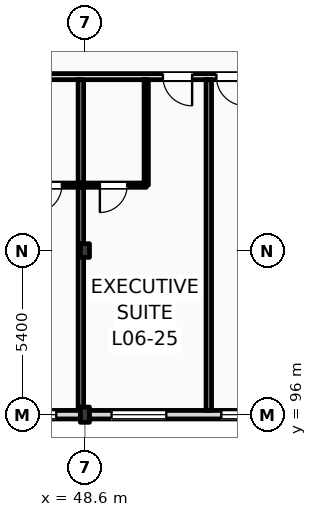
"""IFC4 building model, lengths in metres.
Left out: names, types, materials, properties, quantities, classifications, styles, units other than length and angle.
Written with IfcOpenShell. Run it as: python <this file> out.ifc"""

import sys

from ifc_helpers import new_model, si_unit, direction, frame, frame_2d, origin, origin_2d, place, context, subcontext, project, spatial, rectangle, i_section, extrude, element, fill, save


model = new_model("IFC4")
c1 = context("Model", 3, precision=1e-05, world=origin(), true_north=direction((0.0, 1.0)))
c2 = subcontext(c1, "Body", "Model", "MODEL_VIEW")
j1 = project(units=[si_unit("LENGTHUNIT", "METRE"), si_unit("PLANEANGLEUNIT", "RADIAN")], contexts=[c1])
p1 = place(None, origin())
s1 = spatial("IfcSite", under=j1, at=p1, CompositionType="ELEMENT")
p2 = place(p1, origin())
s2 = spatial("IfcBuilding", under=s1, at=p2, CompositionType="ELEMENT")
p3 = place(p2, frame((0.0, 0.0, 28.2)))
s3 = spatial("IfcBuildingStorey", under=s2, at=p3, CompositionType="ELEMENT", Elevation=28.2)
p4 = place(p3, frame((48.6, 96.0, 0.0), z_axis=(0.0, 0.0, 1.0), x_axis=(1.0, 0.0, 0.0)))
e1 = element("IfcColumn", 1, at=p4, inside=s3, PredefinedType="COLUMN", context=c2, shape_type="SweptSolid", body=[
    extrude(i_section(OverallWidth=0.3, OverallDepth=0.5, WebThickness=0.014, FlangeThickness=0.028, FilletRadius=0.027, at=origin_2d()), origin(), (0.0, 0.0, 1.0), 3.6),
])
p5 = place(p3, frame((48.6, 101.4, 0.0), z_axis=(0.0, 0.0, 1.0), x_axis=(1.0, 0.0, 0.0)))
e2 = element("IfcColumn", 2, at=p5, inside=s3, PredefinedType="COLUMN", context=c2, shape_type="SweptSolid", body=[
    extrude(i_section(OverallWidth=0.3, OverallDepth=0.45, WebThickness=0.014, FlangeThickness=0.026, FilletRadius=0.027, at=origin_2d()), origin(), (0.0, 0.0, 1.0), 3.6),
])
p6 = place(p3, frame((25.2, 96.0, 0.0), z_axis=(0.0, 0.0, 1.0), x_axis=(1.0, 0.0, 0.0)))
e3 = element("IfcWall", 3, at=p6, inside=s3, PredefinedType="STANDARD", context=c2, shape_type="SweptSolid", body=[
    extrude(rectangle(XDim=94.8, YDim=0.28, at=frame_2d((47.4, 0.0))), origin(), (0.0, 0.0, 1.0), 2.8),
])
p7 = place(p6, frame((16.454, 0.0, 0.9)))
e4 = element("IfcOpeningElement", 4, at=p7, cuts=e3, PredefinedType="OPENING", context=c2, shape_type="SweptSolid", body=[
    extrude(rectangle(XDim=2.7, YDim=1.72, at=frame_2d((1.35, 0.86))), frame((0.0, 0.15, 0.0), z_axis=(0.0, -1.0, 0.0), x_axis=(1.0, 0.0, 0.0)), (0.0, 0.0, 1.0), 0.3),
])
p8 = place(p6, frame((20.068, 0.0, 0.9)))
e5 = element("IfcOpeningElement", 5, at=p8, cuts=e3, PredefinedType="OPENING", context=c2, shape_type="SweptSolid", body=[
    extrude(rectangle(XDim=2.389, YDim=1.72, at=frame_2d((1.194, 0.86))), frame((0.0, 0.15, 0.0), z_axis=(0.0, -1.0, 0.0), x_axis=(1.0, 0.0, 0.0)), (0.0, 0.0, 1.0), 0.3),
])
p9 = place(p6, frame((24.277, 0.0, 0.9)))
e6 = element("IfcOpeningElement", 6, at=p9, cuts=e3, PredefinedType="OPENING", context=c2, shape_type="SweptSolid", body=[
    extrude(rectangle(XDim=1.8, YDim=1.72, at=frame_2d((0.9, 0.86))), frame((0.0, 0.15, 0.0), z_axis=(0.0, -1.0, 0.0), x_axis=(1.0, 0.0, 0.0)), (0.0, 0.0, 1.0), 0.3),
])
p10 = place(p6, frame((27.885, 0.0, 0.9)))
e7 = element("IfcOpeningElement", 7, at=p10, cuts=e3, PredefinedType="OPENING", context=c2, shape_type="SweptSolid", body=[
    extrude(rectangle(XDim=2.388, YDim=1.72, at=frame_2d((1.194, 0.86))), frame((0.0, 0.15, 0.0), z_axis=(0.0, -1.0, 0.0), x_axis=(1.0, 0.0, 0.0)), (0.0, 0.0, 1.0), 0.3),
])
p11 = place(p6, frame((32.093, 0.0, 0.9)))
e8 = element("IfcOpeningElement", 8, at=p11, cuts=e3, PredefinedType="OPENING", context=c2, shape_type="SweptSolid", body=[
    extrude(rectangle(XDim=1.8, YDim=1.72, at=frame_2d((0.9, 0.86))), frame((0.0, 0.15, 0.0), z_axis=(0.0, -1.0, 0.0), x_axis=(1.0, 0.0, 0.0)), (0.0, 0.0, 1.0), 0.3),
])
p12 = place(p6, frame((35.702, 0.0, 0.9)))
e9 = element("IfcOpeningElement", 9, at=p12, cuts=e3, PredefinedType="OPENING", context=c2, shape_type="SweptSolid", body=[
    extrude(rectangle(XDim=2.488, YDim=1.72, at=frame_2d((1.244, 0.86))), frame((0.0, 0.15, 0.0), z_axis=(0.0, -1.0, 0.0), x_axis=(1.0, 0.0, 0.0)), (0.0, 0.0, 1.0), 0.3),
])
p13 = place(p6, frame((55.56, 0.0, 0.9)))
e10 = element("IfcOpeningElement", 10, at=p13, cuts=e3, PredefinedType="OPENING", context=c2, shape_type="SweptSolid", body=[
    extrude(rectangle(XDim=1.8, YDim=1.72, at=frame_2d((0.9, 0.86))), frame((0.0, 0.15, 0.0), z_axis=(0.0, -1.0, 0.0), x_axis=(1.0, 0.0, 0.0)), (0.0, 0.0, 1.0), 0.3),
])
p14 = place(p6, frame((58.985, 0.0, 0.9)))
e11 = element("IfcOpeningElement", 11, at=p14, cuts=e3, PredefinedType="OPENING", context=c2, shape_type="SweptSolid", body=[
    extrude(rectangle(XDim=1.8, YDim=1.72, at=frame_2d((0.9, 0.86))), frame((0.0, 0.15, 0.0), z_axis=(0.0, -1.0, 0.0), x_axis=(1.0, 0.0, 0.0)), (0.0, 0.0, 1.0), 0.3),
])
p15 = place(p6, frame((63.21, 0.0, 0.9)))
e12 = element("IfcOpeningElement", 12, at=p15, cuts=e3, PredefinedType="OPENING", context=c2, shape_type="SweptSolid", body=[
    extrude(rectangle(XDim=2.525, YDim=1.72, at=frame_2d((1.262, 0.86))), frame((0.0, 0.15, 0.0), z_axis=(0.0, -1.0, 0.0), x_axis=(1.0, 0.0, 0.0)), (0.0, 0.0, 1.0), 0.3),
])
p16 = place(p6, frame((66.955, 0.0, 0.9)))
e13 = element("IfcOpeningElement", 13, at=p16, cuts=e3, PredefinedType="OPENING", context=c2, shape_type="SweptSolid", body=[
    extrude(rectangle(XDim=1.8, YDim=1.72, at=frame_2d((0.9, 0.86))), frame((0.0, 0.15, 0.0), z_axis=(0.0, -1.0, 0.0), x_axis=(1.0, 0.0, 0.0)), (0.0, 0.0, 1.0), 0.3),
])
p17 = place(p6, frame((71.892, 0.0, 0.9)))
e14 = element("IfcOpeningElement", 14, at=p17, cuts=e3, PredefinedType="OPENING", context=c2, shape_type="SweptSolid", body=[
    extrude(rectangle(XDim=1.1, YDim=1.5, at=frame_2d((0.55, 0.75))), frame((0.0, 0.15, 0.0), z_axis=(0.0, -1.0, 0.0), x_axis=(1.0, 0.0, 0.0)), (0.0, 0.0, 1.0), 0.3),
])
p18 = place(p6, frame((75.802, 0.0, 0.9)))
e15 = element("IfcOpeningElement", 15, at=p18, cuts=e3, PredefinedType="OPENING", context=c2, shape_type="SweptSolid", body=[
    extrude(rectangle(XDim=1.25, YDim=1.6, at=frame_2d((0.625, 0.8))), frame((0.0, 0.15, 0.0), z_axis=(0.0, -1.0, 0.0), x_axis=(1.0, 0.0, 0.0)), (0.0, 0.0, 1.0), 0.3),
])
p19 = place(p6, frame((79.712, 0.0, 0.9)))
e16 = element("IfcOpeningElement", 16, at=p19, cuts=e3, PredefinedType="OPENING", context=c2, shape_type="SweptSolid", body=[
    extrude(rectangle(XDim=1.4, YDim=1.7, at=frame_2d((0.7, 0.85))), frame((0.0, 0.15, 0.0), z_axis=(0.0, -1.0, 0.0), x_axis=(1.0, 0.0, 0.0)), (0.0, 0.0, 1.0), 0.3),
])
p20 = place(p6, frame((83.597, 0.0, 0.9)))
e17 = element("IfcOpeningElement", 17, at=p20, cuts=e3, PredefinedType="OPENING", context=c2, shape_type="SweptSolid", body=[
    extrude(rectangle(XDim=1.6, YDim=1.72, at=frame_2d((0.8, 0.86))), frame((0.0, 0.15, 0.0), z_axis=(0.0, -1.0, 0.0), x_axis=(1.0, 0.0, 0.0)), (0.0, 0.0, 1.0), 0.3),
])
p21 = place(p6, frame((87.507, 0.0, 0.9)))
e18 = element("IfcOpeningElement", 18, at=p21, cuts=e3, PredefinedType="OPENING", context=c2, shape_type="SweptSolid", body=[
    extrude(rectangle(XDim=1.75, YDim=1.72, at=frame_2d((0.875, 0.86))), frame((0.0, 0.15, 0.0), z_axis=(0.0, -1.0, 0.0), x_axis=(1.0, 0.0, 0.0)), (0.0, 0.0, 1.0), 0.3),
])
p22 = place(p6, frame((91.328, 0.0, 0.9)))
e19 = element("IfcOpeningElement", 19, at=p22, cuts=e3, PredefinedType="OPENING", context=c2, shape_type="SweptSolid", body=[
    extrude(rectangle(XDim=2.0, YDim=1.72, at=frame_2d((1.0, 0.86))), frame((0.0, 0.15, 0.0), z_axis=(0.0, -1.0, 0.0), x_axis=(1.0, 0.0, 0.0)), (0.0, 0.0, 1.0), 0.3),
])
p23 = place(p3, frame((40.76, 107.12, 0.0), z_axis=(0.0, 0.0, 1.0), x_axis=(1.0, 0.0, 0.0)))
e20 = element("IfcWall", 20, at=p23, inside=s3, PredefinedType="PARTITIONING", context=c2, shape_type="SweptSolid", body=[
    extrude(rectangle(XDim=23.44, YDim=0.2, at=frame_2d((11.72, 0.0))), origin(), (0.0, 0.0, 1.0), 3.36),
])
p24 = place(p23, frame((2.639, 0.0, 0.0)))
e21 = element("IfcOpeningElement", 21, at=p24, cuts=e20, PredefinedType="OPENING", context=c2, shape_type="SweptSolid", body=[
    extrude(rectangle(XDim=0.96, YDim=2.2, at=frame_2d((0.48, 1.1))), frame((0.0, 0.11, 0.0), z_axis=(0.0, -1.0, 0.0), x_axis=(1.0, 0.0, 0.0)), (0.0, 0.0, 1.0), 0.22),
])
p25 = place(p23, frame((4.348, 0.0, 0.0)))
e22 = element("IfcOpeningElement", 22, at=p25, cuts=e20, PredefinedType="OPENING", context=c2, shape_type="SweptSolid", body=[
    extrude(rectangle(XDim=0.96, YDim=2.2, at=frame_2d((0.48, 1.1))), frame((0.0, 0.11, 0.0), z_axis=(0.0, -1.0, 0.0), x_axis=(1.0, 0.0, 0.0)), (0.0, 0.0, 1.0), 0.22),
])
p26 = place(p23, frame((10.406, 0.0, 0.0)))
e23 = element("IfcOpeningElement", 23, at=p26, cuts=e20, PredefinedType="OPENING", context=c2, shape_type="SweptSolid", body=[
    extrude(rectangle(XDim=0.96, YDim=2.2, at=frame_2d((0.48, 1.1))), frame((0.0, 0.11, 0.0), z_axis=(0.0, -1.0, 0.0), x_axis=(1.0, 0.0, 0.0)), (0.0, 0.0, 1.0), 0.22),
])
p27 = place(p23, frame((12.164, 0.0, 0.0)))
e24 = element("IfcOpeningElement", 24, at=p27, cuts=e20, PredefinedType="OPENING", context=c2, shape_type="SweptSolid", body=[
    extrude(rectangle(XDim=0.96, YDim=2.2, at=frame_2d((0.48, 1.1))), frame((0.0, 0.11, 0.0), z_axis=(0.0, -1.0, 0.0), x_axis=(1.0, 0.0, 0.0)), (0.0, 0.0, 1.0), 0.22),
])
p28 = place(p23, frame((18.223, 0.0, 0.0)))
e25 = element("IfcOpeningElement", 25, at=p28, cuts=e20, PredefinedType="OPENING", context=c2, shape_type="SweptSolid", body=[
    extrude(rectangle(XDim=0.96, YDim=2.2, at=frame_2d((0.48, 1.1))), frame((0.0, 0.11, 0.0), z_axis=(0.0, -1.0, 0.0), x_axis=(1.0, 0.0, 0.0)), (0.0, 0.0, 1.0), 0.22),
])
p29 = place(p23, frame((20.031, 0.0, 0.0)))
e26 = element("IfcOpeningElement", 26, at=p29, cuts=e20, PredefinedType="OPENING", context=c2, shape_type="SweptSolid", body=[
    extrude(rectangle(XDim=0.96, YDim=2.2, at=frame_2d((0.48, 1.1))), frame((0.0, 0.11, 0.0), z_axis=(0.0, -1.0, 0.0), x_axis=(1.0, 0.0, 0.0)), (0.0, 0.0, 1.0), 0.22),
])
p30 = place(p3, frame((48.467, 96.14, 0.0), z_axis=(0.0, 0.0, 1.0), x_axis=(0.0, 1.0, 0.0)))
e27 = element("IfcWall", 27, at=p30, inside=s3, PredefinedType="PARTITIONING", context=c2, shape_type="SweptSolid", body=[
    extrude(rectangle(XDim=10.88, YDim=0.18, at=frame_2d((5.44, 0.0))), origin(), (0.0, 0.0, 1.0), 2.99),
])
p31 = place(p3, frame((46.317, 103.55, 0.0), z_axis=(0.0, 0.0, 1.0), x_axis=(1.0, 0.0, 0.0)))
e28 = element("IfcWall", 28, at=p31, inside=s3, PredefinedType="PARTITIONING", context=c2, shape_type="SweptSolid", body=[
    extrude(rectangle(XDim=2.15, YDim=0.14, at=frame_2d((1.075, 0.0))), origin(), (0.0, 0.0, 1.0), 3.36),
])
p32 = place(p31, frame((0.625, 0.0, 0.0)))
e29 = element("IfcOpeningElement", 29, at=p32, cuts=e28, PredefinedType="OPENING", context=c2, shape_type="SweptSolid", body=[
    extrude(rectangle(XDim=0.9, YDim=2.1, at=frame_2d((0.45, 1.05))), frame((0.0, 0.08, 0.0), z_axis=(0.0, -1.0, 0.0), x_axis=(1.0, 0.0, 0.0)), (0.0, 0.0, 1.0), 0.16),
])
p33 = place(p3, frame((52.675, 96.14, 0.0), z_axis=(0.0, 0.0, 1.0), x_axis=(0.0, 1.0, 0.0)))
e30 = element("IfcWall", 30, at=p33, inside=s3, PredefinedType="PARTITIONING", context=c2, shape_type="SweptSolid", body=[
    extrude(rectangle(XDim=10.88, YDim=0.18, at=frame_2d((5.44, 0.0))), origin(), (0.0, 0.0, 1.0), 3.36),
])
p34 = place(p3, frame((50.617, 103.55, 0.0), z_axis=(0.0, 0.0, 1.0), x_axis=(0.0, 1.0, 0.0)))
e31 = element("IfcWall", 31, at=p34, inside=s3, PredefinedType="PARTITIONING", context=c2, shape_type="SweptSolid", body=[
    extrude(rectangle(XDim=3.47, YDim=0.14, at=frame_2d((1.735, 0.0))), origin(), (0.0, 0.0, 1.0), 3.36),
])
p35 = place(p3, frame((48.467, 103.55, 0.0), z_axis=(0.0, 0.0, 1.0), x_axis=(1.0, 0.0, 0.0)))
e32 = element("IfcWall", 32, at=p35, inside=s3, PredefinedType="PARTITIONING", context=c2, shape_type="SweptSolid", body=[
    extrude(rectangle(XDim=2.15, YDim=0.14, at=frame_2d((1.075, 0.0))), origin(), (0.0, 0.0, 1.0), 3.36),
])
p36 = place(p35, frame((0.625, 0.0, 0.0)))
e33 = element("IfcOpeningElement", 33, at=p36, cuts=e32, PredefinedType="OPENING", context=c2, shape_type="SweptSolid", body=[
    extrude(rectangle(XDim=0.9, YDim=2.1, at=frame_2d((0.45, 1.05))), frame((0.0, 0.08, 0.0), z_axis=(0.0, -1.0, 0.0), x_axis=(1.0, 0.0, 0.0)), (0.0, 0.0, 1.0), 0.16),
])
p37 = place(p8, origin())
e34 = element("IfcWindow", 34, at=p37, inside=s3, PartitioningType="DOUBLE_PANEL_VERTICAL", PredefinedType="WINDOW", context=c2, shape_type="SweptSolid", body=[
    extrude(rectangle(XDim=2.389, YDim=1.72, at=frame_2d((1.194, 0.86))), frame((0.0, 0.03, 0.0), z_axis=(0.0, -1.0, 0.0), x_axis=(1.0, 0.0, 0.0)), (0.0, 0.0, 1.0), 0.06),
])
fill(e5, e34)
p38 = place(p9, origin())
e35 = element("IfcWindow", 35, at=p38, inside=s3, PartitioningType="DOUBLE_PANEL_VERTICAL", PredefinedType="WINDOW", context=c2, shape_type="SweptSolid", body=[
    extrude(rectangle(XDim=1.8, YDim=1.72, at=frame_2d((0.9, 0.86))), frame((0.0, 0.03, 0.0), z_axis=(0.0, -1.0, 0.0), x_axis=(1.0, 0.0, 0.0)), (0.0, 0.0, 1.0), 0.06),
])
fill(e6, e35)
p39 = place(p10, origin())
e36 = element("IfcWindow", 36, at=p39, inside=s3, PartitioningType="DOUBLE_PANEL_VERTICAL", PredefinedType="WINDOW", context=c2, shape_type="SweptSolid", body=[
    extrude(rectangle(XDim=2.388, YDim=1.72, at=frame_2d((1.194, 0.86))), frame((0.0, 0.03, 0.0), z_axis=(0.0, -1.0, 0.0), x_axis=(1.0, 0.0, 0.0)), (0.0, 0.0, 1.0), 0.06),
])
fill(e7, e36)
p40 = place(p32, frame((0.9, 0.0, 0.0), z_axis=(0.0, 0.0, 1.0), x_axis=(-1.0, 0.0, 0.0)))
e37 = element("IfcDoor", 37, at=p40, inside=s3, OperationType="SINGLE_SWING_LEFT", PredefinedType="DOOR", context=c2, shape_type="SweptSolid", body=[
    extrude(rectangle(XDim=0.9, YDim=2.1, at=frame_2d((0.45, 1.05))), frame((0.0, 0.025, 0.0), z_axis=(0.0, -1.0, 0.0), x_axis=(1.0, 0.0, 0.0)), (0.0, 0.0, 1.0), 0.05),
])
fill(e29, e37)
p41 = place(p26, frame((0.96, 0.0, 0.0), z_axis=(0.0, 0.0, 1.0), x_axis=(-1.0, 0.0, 0.0)))
e38 = element("IfcDoor", 38, at=p41, inside=s3, OperationType="SINGLE_SWING_RIGHT", PredefinedType="DOOR", context=c2, shape_type="SweptSolid", body=[
    extrude(rectangle(XDim=0.96, YDim=2.2, at=frame_2d((0.48, 1.1))), frame((0.0, 0.025, 0.0), z_axis=(0.0, -1.0, 0.0), x_axis=(1.0, 0.0, 0.0)), (0.0, 0.0, 1.0), 0.05),
])
fill(e23, e38)
p42 = place(p36, frame((0.9, 0.0, 0.0), z_axis=(0.0, 0.0, 1.0), x_axis=(-1.0, 0.0, 0.0)))
e39 = element("IfcDoor", 39, at=p42, inside=s3, OperationType="SINGLE_SWING_LEFT", PredefinedType="DOOR", context=c2, shape_type="SweptSolid", body=[
    extrude(rectangle(XDim=0.9, YDim=2.1, at=frame_2d((0.45, 1.05))), frame((0.0, 0.025, 0.0), z_axis=(0.0, -1.0, 0.0), x_axis=(1.0, 0.0, 0.0)), (0.0, 0.0, 1.0), 0.05),
])
fill(e33, e39)
p43 = place(p27, frame((0.96, 0.0, 0.0), z_axis=(0.0, 0.0, 1.0), x_axis=(-1.0, 0.0, 0.0)))
e40 = element("IfcDoor", 40, at=p43, inside=s3, OperationType="SINGLE_SWING_RIGHT", PredefinedType="DOOR", context=c2, shape_type="SweptSolid", body=[
    extrude(rectangle(XDim=0.96, YDim=2.2, at=frame_2d((0.48, 1.1))), frame((0.0, 0.025, 0.0), z_axis=(0.0, -1.0, 0.0), x_axis=(1.0, 0.0, 0.0)), (0.0, 0.0, 1.0), 0.05),
])
fill(e24, e40)
save(model, sys.argv[1])
